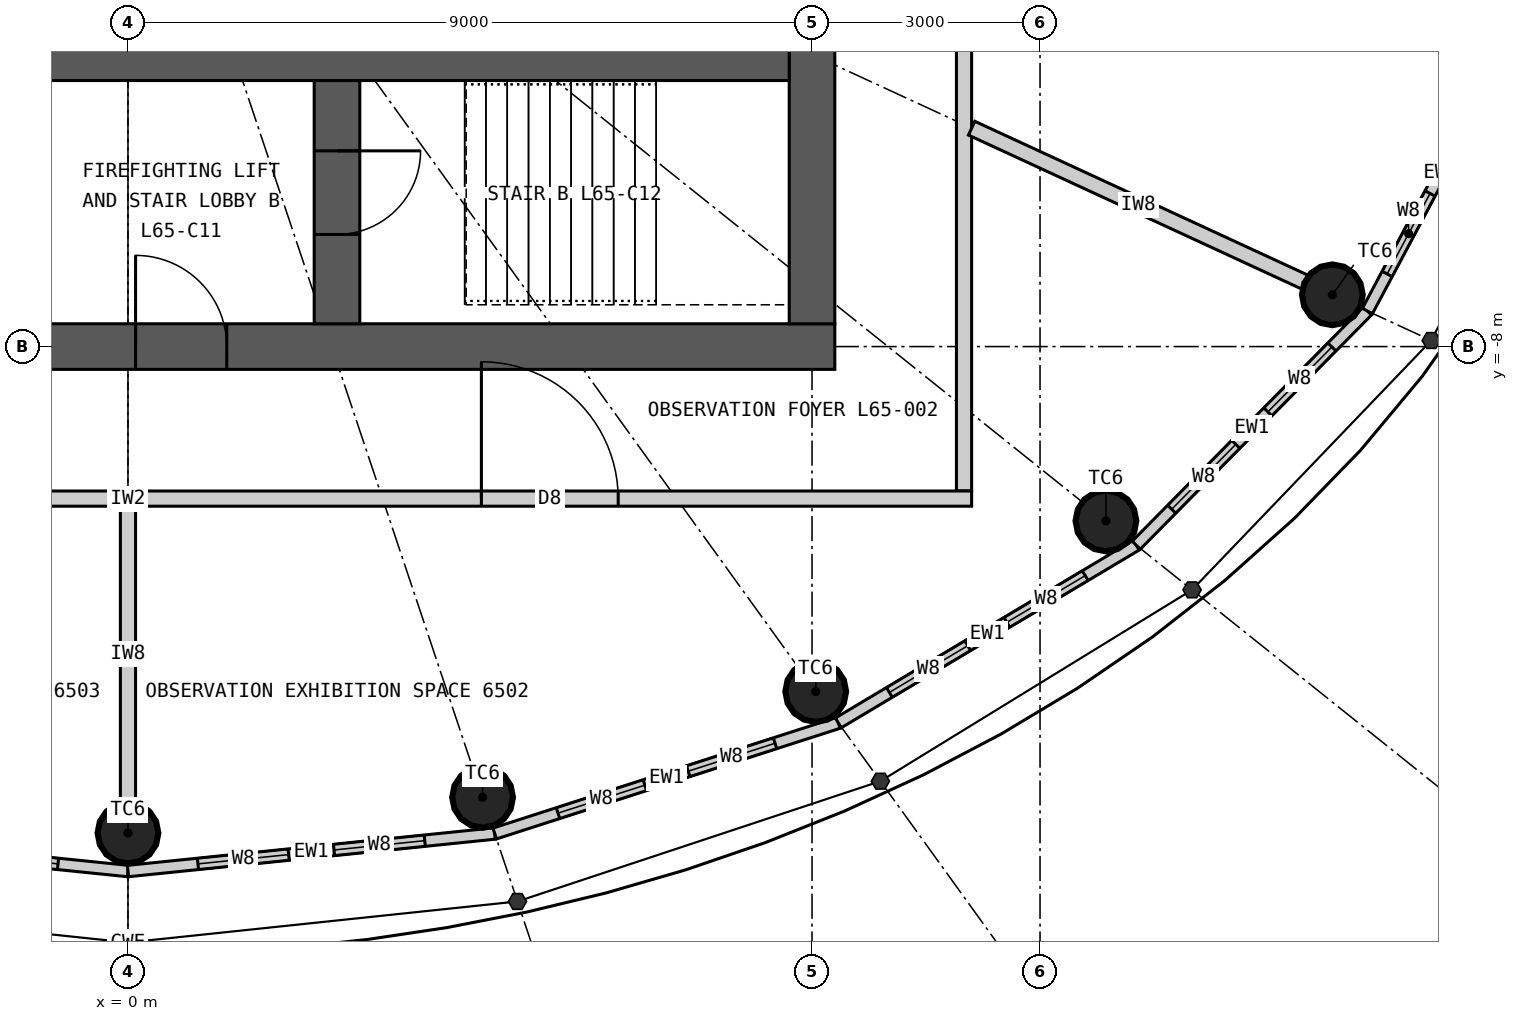
"""IFC4 building model, lengths in metres.
Left out: names, types, materials, properties, quantities, classifications, styles, units other than length and angle.
Written with IfcOpenShell. Run it as: python <this file> out.ifc"""

import sys

from ifc_helpers import new_model, si_unit, direction, frame, frame_2d, origin, origin_2d, place, context, subcontext, project, spatial, rectangle, circle, extrude, element, fill, save


model = new_model("IFC4")
c1 = context("Model", 3, precision=1e-05, world=origin(), true_north=direction((0.0, 1.0)))
c2 = subcontext(c1, "Body", "Model", "MODEL_VIEW")
j1 = project(units=[si_unit("LENGTHUNIT", "METRE"), si_unit("PLANEANGLEUNIT", "RADIAN")], contexts=[c1])
p1 = place(None, origin())
s1 = spatial("IfcSite", under=j1, at=p1, CompositionType="ELEMENT")
p2 = place(p1, origin())
s2 = spatial("IfcBuilding", under=s1, at=p2, CompositionType="ELEMENT")
p3 = place(p2, frame((0.0, 0.0, 242.7)))
s3 = spatial("IfcBuildingStorey", under=s2, at=p3, CompositionType="ELEMENT", Elevation=242.7)
for number, where, z_axis, x_axis in (
    (1, (0.0, -14.4, 0.0), (0.0, 0.0, 1.0), (1.0, 0.0, 0.0)),
    (2, (4.666, -13.929, 0.0), (0.0, 0.0, 1.0), (1.0, 0.0, 0.0)),
    (3, (9.049, -12.538, 0.0), (0.0, 0.0, 1.0), (1.0, 0.0, 0.0)),
    (4, (12.867, -10.294, 0.0), (0.0, 0.0, 1.0), (1.0, 0.0, 0.0)),
    (5, (15.846, -7.319, 0.0), (0.0, 0.0, 1.0), (1.0, 0.0, 0.0)),
):
    element("IfcColumn", number, at=place(p3, frame(where, z_axis=z_axis, x_axis=x_axis)), inside=s3, PredefinedType="COLUMN", context=c2, shape_type="SweptSolid", body=[
        extrude(circle(Radius=0.4, at=origin_2d()), origin(), (0.0, 0.0, 1.0), 6.0),
    ])
p4 = place(p3, frame((9.3, -8.0, 0.0), z_axis=(0.0, 0.0, 1.0), x_axis=(-1.0, 0.0, 0.0)))
e6 = element("IfcWall", 6, at=p4, inside=s3, PredefinedType="SHEAR", context=c2, shape_type="SweptSolid", body=[
    extrude(rectangle(XDim=18.6, YDim=0.6, at=frame_2d((9.3, 0.0))), origin(), (0.0, 0.0, 1.0), 6.0),
])
p5 = place(p4, frame((8.0, 0.0, 0.0)))
e7 = element("IfcOpeningElement", 7, at=p5, cuts=e6, PredefinedType="OPENING", context=c2, shape_type="SweptSolid", body=[
    extrude(rectangle(XDim=1.2, YDim=2.2, at=frame_2d((0.6, 1.1))), frame((0.0, 0.31, 0.0), z_axis=(0.0, -1.0, 0.0), x_axis=(1.0, 0.0, 0.0)), (0.0, 0.0, 1.0), 0.62),
])
p6 = place(p4, frame((15.6, 0.0, 0.0)))
e8 = element("IfcOpeningElement", 8, at=p6, cuts=e6, PredefinedType="OPENING", context=c2, shape_type="SweptSolid", body=[
    extrude(rectangle(XDim=0.9, YDim=2.2, at=frame_2d((0.45, 1.1))), frame((0.0, 0.31, 0.0), z_axis=(0.0, -1.0, 0.0), x_axis=(1.0, 0.0, 0.0)), (0.0, 0.0, 1.0), 0.62),
])
p7 = place(p3, frame((9.0, -7.7, 0.0), z_axis=(0.0, 0.0, 1.0), x_axis=(0.0, 1.0, 0.0)))
e9 = element("IfcWall", 9, at=p7, inside=s3, PredefinedType="SHEAR", context=c2, shape_type="SweptSolid", body=[
    extrude(rectangle(XDim=15.4, YDim=0.6, at=frame_2d((7.7, 0.0))), origin(), (0.0, 0.0, 1.0), 6.0),
])
p8 = place(p7, frame((6.8, 0.0, 0.0)))
e10 = element("IfcOpeningElement", 10, at=p8, cuts=e9, PredefinedType="OPENING", context=c2, shape_type="SweptSolid", body=[
    extrude(rectangle(XDim=1.8, YDim=2.2, at=frame_2d((0.9, 1.1))), frame((0.0, 0.31, 0.0), z_axis=(0.0, -1.0, 0.0), x_axis=(1.0, 0.0, 0.0)), (0.0, 0.0, 1.0), 0.62),
])
p9 = place(p3, frame((-8.7, -4.3, 0.0), z_axis=(0.0, 0.0, 1.0), x_axis=(1.0, 0.0, 0.0)))
e11 = element("IfcWall", 11, at=p9, inside=s3, PredefinedType="SHEAR", context=c2, shape_type="SweptSolid", body=[
    extrude(rectangle(XDim=17.4, YDim=0.4, at=frame_2d((8.7, 0.0))), origin(), (0.0, 0.0, 1.0), 6.0),
])
p10 = place(p3, frame((2.75, -7.7, 0.0), z_axis=(0.0, 0.0, 1.0), x_axis=(0.0, 1.0, 0.0)))
e12 = element("IfcWall", 12, at=p10, inside=s3, PredefinedType="SHEAR", context=c2, shape_type="SweptSolid", body=[
    extrude(rectangle(XDim=3.2, YDim=0.6, at=frame_2d((1.6, 0.0))), origin(), (0.0, 0.0, 1.0), 6.0),
])
p11 = place(p10, frame((1.175, 0.0, 0.0)))
e13 = element("IfcOpeningElement", 13, at=p11, cuts=e12, PredefinedType="OPENING", context=c2, shape_type="SweptSolid", body=[
    extrude(rectangle(XDim=1.1, YDim=2.2, at=frame_2d((0.55, 1.1))), frame((0.0, 0.31, 0.0), z_axis=(0.0, -1.0, 0.0), x_axis=(1.0, 0.0, 0.0)), (0.0, 0.0, 1.0), 0.62),
])
p12 = place(p3, frame((-4.825, -14.406, 0.0), z_axis=(0.0, 0.0, 1.0), x_axis=(0.994807343212, -0.10177597895, 0.0)))
e14 = element("IfcWall", 14, at=p12, inside=s3, PredefinedType="ELEMENTEDWALL", context=c2, shape_type="SweptSolid", body=[
    extrude(rectangle(XDim=4.85, YDim=0.15, at=frame_2d((2.425, 0.0))), origin(), (0.0, 0.0, 1.0), 5.7),
])
p13 = place(p12, frame((0.925, 0.0, 0.5)))
e15 = element("IfcOpeningElement", 15, at=p13, cuts=e14, PredefinedType="OPENING", context=c2, shape_type="SweptSolid", body=[
    extrude(rectangle(XDim=1.2, YDim=4.2, at=frame_2d((0.6, 2.1))), frame((0.0, 0.085, 0.0), z_axis=(0.0, -1.0, 0.0), x_axis=(1.0, 0.0, 0.0)), (0.0, 0.0, 1.0), 0.17),
])
p14 = place(p12, frame((2.725, 0.0, 0.5)))
e16 = element("IfcOpeningElement", 16, at=p14, cuts=e14, PredefinedType="OPENING", context=c2, shape_type="SweptSolid", body=[
    extrude(rectangle(XDim=1.2, YDim=4.2, at=frame_2d((0.6, 2.1))), frame((0.0, 0.085, 0.0), z_axis=(0.0, -1.0, 0.0), x_axis=(1.0, 0.0, 0.0)), (0.0, 0.0, 1.0), 0.17),
])
p15 = place(p3, frame((0.0, -14.9, 0.0), z_axis=(0.0, 0.0, 1.0), x_axis=(0.994807343212, 0.10177597895, 0.0)))
e17 = element("IfcWall", 17, at=p15, inside=s3, PredefinedType="ELEMENTEDWALL", context=c2, shape_type="SweptSolid", body=[
    extrude(rectangle(XDim=4.85, YDim=0.15, at=frame_2d((2.425, 0.0))), origin(), (0.0, 0.0, 1.0), 5.7),
])
p16 = place(p15, frame((0.925, 0.0, 0.5)))
e18 = element("IfcOpeningElement", 18, at=p16, cuts=e17, PredefinedType="OPENING", context=c2, shape_type="SweptSolid", body=[
    extrude(rectangle(XDim=1.2, YDim=4.2, at=frame_2d((0.6, 2.1))), frame((0.0, 0.085, 0.0), z_axis=(0.0, -1.0, 0.0), x_axis=(1.0, 0.0, 0.0)), (0.0, 0.0, 1.0), 0.17),
])
p17 = place(p15, frame((2.725, 0.0, 0.5)))
e19 = element("IfcOpeningElement", 19, at=p17, cuts=e17, PredefinedType="OPENING", context=c2, shape_type="SweptSolid", body=[
    extrude(rectangle(XDim=1.2, YDim=4.2, at=frame_2d((0.6, 2.1))), frame((0.0, 0.085, 0.0), z_axis=(0.0, -1.0, 0.0), x_axis=(1.0, 0.0, 0.0)), (0.0, 0.0, 1.0), 0.17),
])
p18 = place(p3, frame((4.825, -14.406, 0.0), z_axis=(0.0, 0.0, 1.0), x_axis=(0.951881908824, 0.306465057804, 0.0)))
e20 = element("IfcWall", 20, at=p18, inside=s3, PredefinedType="ELEMENTEDWALL", context=c2, shape_type="SweptSolid", body=[
    extrude(rectangle(XDim=4.75, YDim=0.15, at=frame_2d((2.375, 0.0))), origin(), (0.0, 0.0, 1.0), 5.7),
])
p19 = place(p18, frame((0.875, 0.0, 0.5)))
e21 = element("IfcOpeningElement", 21, at=p19, cuts=e20, PredefinedType="OPENING", context=c2, shape_type="SweptSolid", body=[
    extrude(rectangle(XDim=1.2, YDim=4.2, at=frame_2d((0.6, 2.1))), frame((0.0, 0.085, 0.0), z_axis=(0.0, -1.0, 0.0), x_axis=(1.0, 0.0, 0.0)), (0.0, 0.0, 1.0), 0.17),
])
p20 = place(p18, frame((2.675, 0.0, 0.5)))
e22 = element("IfcOpeningElement", 22, at=p20, cuts=e20, PredefinedType="OPENING", context=c2, shape_type="SweptSolid", body=[
    extrude(rectangle(XDim=1.2, YDim=4.2, at=frame_2d((0.6, 2.1))), frame((0.0, 0.085, 0.0), z_axis=(0.0, -1.0, 0.0), x_axis=(1.0, 0.0, 0.0)), (0.0, 0.0, 1.0), 0.17),
])
p21 = place(p3, frame((9.346, -12.951, 0.0), z_axis=(0.0, 0.0, 1.0), x_axis=(0.858849230109, 0.512228464594, 0.0)))
e23 = element("IfcWall", 23, at=p21, inside=s3, PredefinedType="ELEMENTEDWALL", context=c2, shape_type="SweptSolid", body=[
    extrude(rectangle(XDim=4.564, YDim=0.15, at=frame_2d((2.282, 0.0))), origin(), (0.0, 0.0, 1.0), 5.7),
])
p22 = place(p21, frame((0.782, 0.0, 0.5)))
e24 = element("IfcOpeningElement", 24, at=p22, cuts=e23, PredefinedType="OPENING", context=c2, shape_type="SweptSolid", body=[
    extrude(rectangle(XDim=1.2, YDim=4.2, at=frame_2d((0.6, 2.1))), frame((0.0, 0.085, 0.0), z_axis=(0.0, -1.0, 0.0), x_axis=(1.0, 0.0, 0.0)), (0.0, 0.0, 1.0), 0.17),
])
p23 = place(p21, frame((2.582, 0.0, 0.5)))
e25 = element("IfcOpeningElement", 25, at=p23, cuts=e23, PredefinedType="OPENING", context=c2, shape_type="SweptSolid", body=[
    extrude(rectangle(XDim=1.2, YDim=4.2, at=frame_2d((0.6, 2.1))), frame((0.0, 0.085, 0.0), z_axis=(0.0, -1.0, 0.0), x_axis=(1.0, 0.0, 0.0)), (0.0, 0.0, 1.0), 0.17),
])
p24 = place(p3, frame((13.266, -10.613, 0.0), z_axis=(0.0, 0.0, 1.0), x_axis=(0.702523956258, 0.711660095048, 0.0)))
e26 = element("IfcWall", 26, at=p24, inside=s3, PredefinedType="ELEMENTEDWALL", context=c2, shape_type="SweptSolid", body=[
    extrude(rectangle(XDim=4.329, YDim=0.15, at=frame_2d((2.165, 0.0))), origin(), (0.0, 0.0, 1.0), 5.7),
])
p25 = place(p24, frame((0.665, 0.0, 0.5)))
e27 = element("IfcOpeningElement", 27, at=p25, cuts=e26, PredefinedType="OPENING", context=c2, shape_type="SweptSolid", body=[
    extrude(rectangle(XDim=1.2, YDim=4.2, at=frame_2d((0.6, 2.1))), frame((0.0, 0.085, 0.0), z_axis=(0.0, -1.0, 0.0), x_axis=(1.0, 0.0, 0.0)), (0.0, 0.0, 1.0), 0.17),
])
p26 = place(p24, frame((2.465, 0.0, 0.5)))
e28 = element("IfcOpeningElement", 28, at=p26, cuts=e26, PredefinedType="OPENING", context=c2, shape_type="SweptSolid", body=[
    extrude(rectangle(XDim=1.2, YDim=4.2, at=frame_2d((0.6, 2.1))), frame((0.0, 0.085, 0.0), z_axis=(0.0, -1.0, 0.0), x_axis=(1.0, 0.0, 0.0)), (0.0, 0.0, 1.0), 0.17),
])
p27 = place(p3, frame((16.307, -7.532, 0.0), z_axis=(0.0, 0.0, 1.0), x_axis=(0.470282591286, 0.882515883332, 0.0)))
e29 = element("IfcWall", 29, at=p27, inside=s3, PredefinedType="ELEMENTEDWALL", context=c2, shape_type="SweptSolid", body=[
    extrude(rectangle(XDim=4.105, YDim=0.15, at=frame_2d((2.052, 0.0))), origin(), (0.0, 0.0, 1.0), 5.7),
])
p28 = place(p27, frame((0.552, 0.0, 0.5)))
e30 = element("IfcOpeningElement", 30, at=p28, cuts=e29, PredefinedType="OPENING", context=c2, shape_type="SweptSolid", body=[
    extrude(rectangle(XDim=1.2, YDim=4.2, at=frame_2d((0.6, 2.1))), frame((0.0, 0.085, 0.0), z_axis=(0.0, -1.0, 0.0), x_axis=(1.0, 0.0, 0.0)), (0.0, 0.0, 1.0), 0.17),
])
p29 = place(p27, frame((2.353, 0.0, 0.5)))
e31 = element("IfcOpeningElement", 31, at=p29, cuts=e29, PredefinedType="OPENING", context=c2, shape_type="SweptSolid", body=[
    extrude(rectangle(XDim=1.2, YDim=4.2, at=frame_2d((0.6, 2.1))), frame((0.0, 0.085, 0.0), z_axis=(0.0, -1.0, 0.0), x_axis=(1.0, 0.0, 0.0)), (0.0, 0.0, 1.0), 0.17),
])
p30 = place(p3, frame((11.0, -9.9, 0.0), z_axis=(0.0, 0.0, 1.0), x_axis=(0.0, 1.0, 0.0)))
e32 = element("IfcWall", 32, at=p30, inside=s3, PredefinedType="PARTITIONING", context=c2, shape_type="SweptSolid", body=[
    extrude(rectangle(XDim=19.8, YDim=0.2, at=frame_2d((9.9, 0.0))), origin(), (0.0, 0.0, 1.0), 5.7),
])
p31 = place(p30, frame((6.737, 0.0, 0.0)))
e33 = element("IfcOpeningElement", 33, at=p31, cuts=e32, PredefinedType="OPENING", context=c2, shape_type="SweptSolid", body=[
    extrude(rectangle(XDim=1.2, YDim=2.2, at=frame_2d((0.6, 1.1))), frame((0.0, 0.11, 0.0), z_axis=(0.0, -1.0, 0.0), x_axis=(1.0, 0.0, 0.0)), (0.0, 0.0, 1.0), 0.22),
])
p32 = place(p3, frame((11.1, -10.0, 0.0), z_axis=(0.0, 0.0, 1.0), x_axis=(-1.0, 0.0, 0.0)))
e34 = element("IfcWall", 34, at=p32, inside=s3, PredefinedType="PARTITIONING", context=c2, shape_type="SweptSolid", body=[
    extrude(rectangle(XDim=22.2, YDim=0.2, at=frame_2d((11.1, 0.0))), origin(), (0.0, 0.0, 1.0), 5.7),
])
p33 = place(p32, frame((4.65, 0.0, 0.0)))
e35 = element("IfcOpeningElement", 35, at=p33, cuts=e34, PredefinedType="OPENING", context=c2, shape_type="SweptSolid", body=[
    extrude(rectangle(XDim=1.8, YDim=2.4, at=frame_2d((0.9, 1.2))), frame((0.0, 0.11, 0.0), z_axis=(0.0, -1.0, 0.0), x_axis=(1.0, 0.0, 0.0)), (0.0, 0.0, 1.0), 0.22),
])
p34 = place(p32, frame((15.75, 0.0, 0.0)))
e36 = element("IfcOpeningElement", 36, at=p34, cuts=e34, PredefinedType="OPENING", context=c2, shape_type="SweptSolid", body=[
    extrude(rectangle(XDim=1.8, YDim=2.4, at=frame_2d((0.9, 1.2))), frame((0.0, 0.11, 0.0), z_axis=(0.0, -1.0, 0.0), x_axis=(1.0, 0.0, 0.0)), (0.0, 0.0, 1.0), 0.22),
])
p35 = place(p3, frame((0.0, -10.1, 0.0), z_axis=(0.0, 0.0, 1.0), x_axis=(0.0, -1.0, 0.0)))
e37 = element("IfcWall", 37, at=p35, inside=s3, PredefinedType="PARTITIONING", context=c2, shape_type="SweptSolid", body=[
    extrude(rectangle(XDim=3.9, YDim=0.2, at=frame_2d((1.95, 0.0))), origin(), (0.0, 0.0, 1.0), 4.85),
])
p36 = place(p3, frame((11.1, -5.127, 0.0), z_axis=(0.0, 0.0, 1.0), x_axis=(0.90783501602, -0.41932753748, 0.0)))
e38 = element("IfcWall", 38, at=p36, inside=s3, PredefinedType="PARTITIONING", context=c2, shape_type="SweptSolid", body=[
    extrude(rectangle(XDim=4.828, YDim=0.2, at=frame_2d((2.414, 0.0))), origin(), (0.0, 0.0, 1.0), 4.8),
])
p37 = place(p14, origin())
e39 = element("IfcWindow", 39, at=p37, inside=s3, PartitioningType="SINGLE_PANEL", PredefinedType="WINDOW", context=c2, shape_type="SweptSolid", body=[
    extrude(rectangle(XDim=1.2, YDim=4.2, at=frame_2d((0.6, 2.1))), frame((0.0, 0.03, 0.0), z_axis=(0.0, -1.0, 0.0), x_axis=(1.0, 0.0, 0.0)), (0.0, 0.0, 1.0), 0.06),
])
fill(e16, e39)
p38 = place(p16, origin())
e40 = element("IfcWindow", 40, at=p38, inside=s3, PartitioningType="SINGLE_PANEL", PredefinedType="WINDOW", context=c2, shape_type="SweptSolid", body=[
    extrude(rectangle(XDim=1.2, YDim=4.2, at=frame_2d((0.6, 2.1))), frame((0.0, 0.03, 0.0), z_axis=(0.0, -1.0, 0.0), x_axis=(1.0, 0.0, 0.0)), (0.0, 0.0, 1.0), 0.06),
])
fill(e18, e40)
p39 = place(p17, origin())
e41 = element("IfcWindow", 41, at=p39, inside=s3, PartitioningType="SINGLE_PANEL", PredefinedType="WINDOW", context=c2, shape_type="SweptSolid", body=[
    extrude(rectangle(XDim=1.2, YDim=4.2, at=frame_2d((0.6, 2.1))), frame((0.0, 0.03, 0.0), z_axis=(0.0, -1.0, 0.0), x_axis=(1.0, 0.0, 0.0)), (0.0, 0.0, 1.0), 0.06),
])
fill(e19, e41)
p40 = place(p19, origin())
e42 = element("IfcWindow", 42, at=p40, inside=s3, PartitioningType="SINGLE_PANEL", PredefinedType="WINDOW", context=c2, shape_type="SweptSolid", body=[
    extrude(rectangle(XDim=1.2, YDim=4.2, at=frame_2d((0.6, 2.1))), frame((0.0, 0.03, 0.0), z_axis=(0.0, -1.0, 0.0), x_axis=(1.0, 0.0, 0.0)), (0.0, 0.0, 1.0), 0.06),
])
fill(e21, e42)
p41 = place(p20, origin())
e43 = element("IfcWindow", 43, at=p41, inside=s3, PartitioningType="SINGLE_PANEL", PredefinedType="WINDOW", context=c2, shape_type="SweptSolid", body=[
    extrude(rectangle(XDim=1.2, YDim=4.2, at=frame_2d((0.6, 2.1))), frame((0.0, 0.03, 0.0), z_axis=(0.0, -1.0, 0.0), x_axis=(1.0, 0.0, 0.0)), (0.0, 0.0, 1.0), 0.06),
])
fill(e22, e43)
p42 = place(p22, origin())
e44 = element("IfcWindow", 44, at=p42, inside=s3, PartitioningType="SINGLE_PANEL", PredefinedType="WINDOW", context=c2, shape_type="SweptSolid", body=[
    extrude(rectangle(XDim=1.2, YDim=4.2, at=frame_2d((0.6, 2.1))), frame((0.0, 0.03, 0.0), z_axis=(0.0, -1.0, 0.0), x_axis=(1.0, 0.0, 0.0)), (0.0, 0.0, 1.0), 0.06),
])
fill(e24, e44)
p43 = place(p23, origin())
e45 = element("IfcWindow", 45, at=p43, inside=s3, PartitioningType="SINGLE_PANEL", PredefinedType="WINDOW", context=c2, shape_type="SweptSolid", body=[
    extrude(rectangle(XDim=1.2, YDim=4.2, at=frame_2d((0.6, 2.1))), frame((0.0, 0.03, 0.0), z_axis=(0.0, -1.0, 0.0), x_axis=(1.0, 0.0, 0.0)), (0.0, 0.0, 1.0), 0.06),
])
fill(e25, e45)
p44 = place(p25, origin())
e46 = element("IfcWindow", 46, at=p44, inside=s3, PartitioningType="SINGLE_PANEL", PredefinedType="WINDOW", context=c2, shape_type="SweptSolid", body=[
    extrude(rectangle(XDim=1.2, YDim=4.2, at=frame_2d((0.6, 2.1))), frame((0.0, 0.03, 0.0), z_axis=(0.0, -1.0, 0.0), x_axis=(1.0, 0.0, 0.0)), (0.0, 0.0, 1.0), 0.06),
])
fill(e27, e46)
p45 = place(p26, origin())
e47 = element("IfcWindow", 47, at=p45, inside=s3, PartitioningType="SINGLE_PANEL", PredefinedType="WINDOW", context=c2, shape_type="SweptSolid", body=[
    extrude(rectangle(XDim=1.2, YDim=4.2, at=frame_2d((0.6, 2.1))), frame((0.0, 0.03, 0.0), z_axis=(0.0, -1.0, 0.0), x_axis=(1.0, 0.0, 0.0)), (0.0, 0.0, 1.0), 0.06),
])
fill(e28, e47)
p46 = place(p28, origin())
e48 = element("IfcWindow", 48, at=p46, inside=s3, PartitioningType="SINGLE_PANEL", PredefinedType="WINDOW", context=c2, shape_type="SweptSolid", body=[
    extrude(rectangle(XDim=1.2, YDim=4.2, at=frame_2d((0.6, 2.1))), frame((0.0, 0.03, 0.0), z_axis=(0.0, -1.0, 0.0), x_axis=(1.0, 0.0, 0.0)), (0.0, 0.0, 1.0), 0.06),
])
fill(e30, e48)
p47 = place(p33, origin())
e49 = element("IfcDoor", 49, at=p47, inside=s3, OperationType="DOUBLE_DOOR_DOUBLE_SWING", PredefinedType="DOOR", context=c2, shape_type="SweptSolid", body=[
    extrude(rectangle(XDim=1.8, YDim=2.4, at=frame_2d((0.9, 1.2))), frame((0.0, 0.025, 0.0), z_axis=(0.0, -1.0, 0.0), x_axis=(1.0, 0.0, 0.0)), (0.0, 0.0, 1.0), 0.05),
])
fill(e35, e49)
p48 = place(p5, origin())
e50 = element("IfcDoor", 50, at=p48, inside=s3, OperationType="SINGLE_SWING_RIGHT", PredefinedType="DOOR", context=c2, shape_type="SweptSolid", body=[
    extrude(rectangle(XDim=1.2, YDim=2.2, at=frame_2d((0.6, 1.1))), frame((0.0, 0.025, 0.0), z_axis=(0.0, -1.0, 0.0), x_axis=(1.0, 0.0, 0.0)), (0.0, 0.0, 1.0), 0.05),
])
fill(e7, e50)
p49 = place(p11, origin())
e51 = element("IfcDoor", 51, at=p49, inside=s3, OperationType="SINGLE_SWING_RIGHT", PredefinedType="DOOR", context=c2, shape_type="SweptSolid", body=[
    extrude(rectangle(XDim=1.1, YDim=2.2, at=frame_2d((0.55, 1.1))), frame((0.0, 0.025, 0.0), z_axis=(0.0, -1.0, 0.0), x_axis=(1.0, 0.0, 0.0)), (0.0, 0.0, 1.0), 0.05),
])
fill(e13, e51)
save(model, sys.argv[1])
